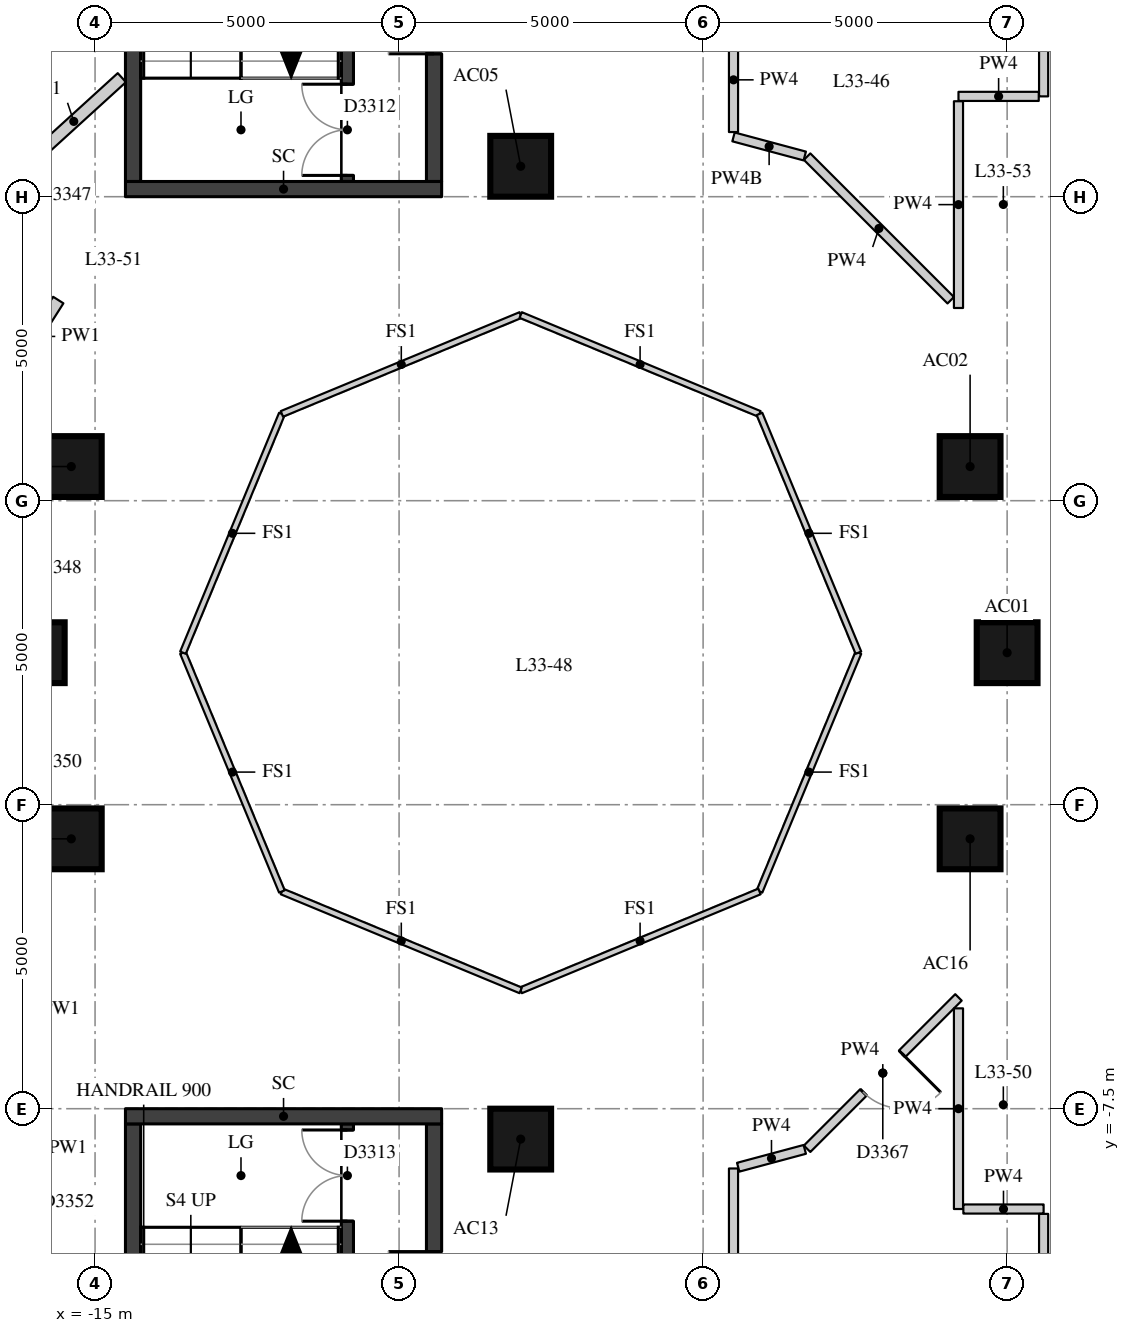
"""IFC4 building model, lengths in metres.
Left out: names, types, materials, properties, quantities, classifications, styles, units other than length and angle.
Written with IfcOpenShell. Run it as: python <this file> out.ifc"""

import sys

from ifc_helpers import new_model, si_unit, direction, frame, frame_2d, origin, origin_2d, place, context, subcontext, project, spatial, rectangle, extrude, element, fill, save


model = new_model("IFC4")
c1 = context("Model", 3, precision=1e-05, world=origin(), true_north=direction((0.0, 1.0)))
c2 = subcontext(c1, "Body", "Model", "MODEL_VIEW")
j1 = project(units=[si_unit("LENGTHUNIT", "METRE"), si_unit("PLANEANGLEUNIT", "RADIAN")], contexts=[c1])
p1 = place(None, origin())
s1 = spatial("IfcSite", under=j1, at=p1, CompositionType="ELEMENT")
p2 = place(p1, origin())
s2 = spatial("IfcBuilding", under=s1, at=p2, CompositionType="ELEMENT")
p3 = place(p2, frame((0.0, 0.0, 118.6)))
s3 = spatial("IfcBuildingStorey", under=s2, at=p3, CompositionType="ELEMENT", Elevation=118.6)
for number, where, z_axis, x_axis in (
    (1, (0.0, 0.0, 0.0), (0.0, 0.0, 1.0), (1.0, 0.0, 0.0)),
    (2, (-0.609, 3.062, 0.0), (0.0, 0.0, 1.0), (1.0, 0.0, 0.0)),
    (3, (-8.0, 8.0, 0.0), (0.0, 0.0, 1.0), (1.0, 0.0, 0.0)),
    (4, (-15.391, 3.062, 0.0), (0.0, 0.0, 1.0), (1.0, 0.0, 0.0)),
    (5, (-16.0, 0.0, 0.0), (0.0, 0.0, 1.0), (1.0, 0.0, 0.0)),
    (6, (-15.391, -3.062, 0.0), (0.0, 0.0, 1.0), (1.0, 0.0, 0.0)),
    (7, (-8.0, -8.0, 0.0), (0.0, 0.0, 1.0), (1.0, 0.0, 0.0)),
    (8, (-0.609, -3.062, 0.0), (0.0, 0.0, 1.0), (1.0, 0.0, 0.0)),
):
    element("IfcColumn", number, at=place(p3, frame(where, z_axis=z_axis, x_axis=x_axis)), inside=s3, PredefinedType="COLUMN", context=c2, shape_type="SweptSolid", body=[
        extrude(rectangle(XDim=1.0, YDim=1.0, at=origin_2d()), origin(), (0.0, 0.0, 1.0), 3.3),
    ])
p4 = place(p3, frame((-10.85, 7.75, 0.0), z_axis=(0.0, 0.0, 1.0), x_axis=(0.0, 1.0, 0.0)))
e9 = element("IfcWall", 9, at=p4, inside=s3, PredefinedType="SHEAR", context=c2, shape_type="SweptSolid", body=[
    extrude(rectangle(XDim=6.0, YDim=0.2, at=frame_2d((3.0, 0.0))), origin(), (0.0, 0.0, 1.0), 3.02),
])
p5 = place(p4, frame((0.1, 0.0, 0.0)))
e10 = element("IfcOpeningElement", 10, at=p5, cuts=e9, PredefinedType="OPENING", context=c2, shape_type="SweptSolid", body=[
    extrude(rectangle(XDim=1.5, YDim=2.1, at=frame_2d((0.75, 1.05))), frame((0.0, 0.11, 0.0), z_axis=(0.0, -1.0, 0.0), x_axis=(1.0, 0.0, 0.0)), (0.0, 0.0, 1.0), 0.22),
])
p6 = place(p3, frame((-10.85, -13.75, 0.0), z_axis=(0.0, 0.0, 1.0), x_axis=(0.0, 1.0, 0.0)))
e11 = element("IfcWall", 11, at=p6, inside=s3, PredefinedType="SHEAR", context=c2, shape_type="SweptSolid", body=[
    extrude(rectangle(XDim=6.0, YDim=0.2, at=frame_2d((3.0, 0.0))), origin(), (0.0, 0.0, 1.0), 3.02),
])
p7 = place(p6, frame((4.4, 0.0, 0.0)))
e12 = element("IfcOpeningElement", 12, at=p7, cuts=e11, PredefinedType="OPENING", context=c2, shape_type="SweptSolid", body=[
    extrude(rectangle(XDim=1.5, YDim=2.1, at=frame_2d((0.75, 1.05))), frame((0.0, 0.11, 0.0), z_axis=(0.0, -1.0, 0.0), x_axis=(1.0, 0.0, 0.0)), (0.0, 0.0, 1.0), 0.22),
])
p8 = place(p3, frame((-14.375, 7.75, -0.28), z_axis=(0.0, 0.0, 1.0), x_axis=(0.0, 1.0, 0.0)))
e13 = element("IfcWall", 13, at=p8, inside=s3, PredefinedType="SHEAR", context=c2, shape_type="SweptSolid", body=[
    extrude(rectangle(XDim=6.0, YDim=0.25, at=frame_2d((3.0, 0.0))), origin(), (0.0, 0.0, 1.0), 3.3),
])
p9 = place(p3, frame((-9.425, 7.75, -0.28), z_axis=(0.0, 0.0, 1.0), x_axis=(0.0, 1.0, 0.0)))
e14 = element("IfcWall", 14, at=p9, inside=s3, PredefinedType="SHEAR", context=c2, shape_type="SweptSolid", body=[
    extrude(rectangle(XDim=6.0, YDim=0.25, at=frame_2d((3.0, 0.0))), origin(), (0.0, 0.0, 1.0), 3.3),
])
p10 = place(p9, frame((2.1, 0.0, 0.28)))
e15 = element("IfcOpeningElement", 15, at=p10, cuts=e14, PredefinedType="OPENING", context=c2, shape_type="SweptSolid", body=[
    extrude(rectangle(XDim=1.5, YDim=2.1, at=frame_2d((0.75, 1.05))), frame((0.0, 0.135, 0.0), z_axis=(0.0, -1.0, 0.0), x_axis=(1.0, 0.0, 0.0)), (0.0, 0.0, 1.0), 0.27),
])
p11 = place(p3, frame((-14.5, 7.625, -0.28), z_axis=(0.0, 0.0, 1.0), x_axis=(1.0, 0.0, 0.0)))
e16 = element("IfcWall", 16, at=p11, inside=s3, PredefinedType="SHEAR", context=c2, shape_type="SweptSolid", body=[
    extrude(rectangle(XDim=5.2, YDim=0.25, at=frame_2d((2.6, 0.0))), origin(), (0.0, 0.0, 1.0), 3.3),
])
p12 = place(p3, frame((-14.375, -13.75, -0.28), z_axis=(0.0, 0.0, 1.0), x_axis=(0.0, 1.0, 0.0)))
e17 = element("IfcWall", 17, at=p12, inside=s3, PredefinedType="SHEAR", context=c2, shape_type="SweptSolid", body=[
    extrude(rectangle(XDim=6.0, YDim=0.25, at=frame_2d((3.0, 0.0))), origin(), (0.0, 0.0, 1.0), 3.3),
])
p13 = place(p3, frame((-9.425, -13.75, -0.28), z_axis=(0.0, 0.0, 1.0), x_axis=(0.0, 1.0, 0.0)))
e18 = element("IfcWall", 18, at=p13, inside=s3, PredefinedType="SHEAR", context=c2, shape_type="SweptSolid", body=[
    extrude(rectangle(XDim=6.0, YDim=0.25, at=frame_2d((3.0, 0.0))), origin(), (0.0, 0.0, 1.0), 3.3),
])
p14 = place(p13, frame((2.4, 0.0, 0.28)))
e19 = element("IfcOpeningElement", 19, at=p14, cuts=e18, PredefinedType="OPENING", context=c2, shape_type="SweptSolid", body=[
    extrude(rectangle(XDim=1.5, YDim=2.1, at=frame_2d((0.75, 1.05))), frame((0.0, 0.135, 0.0), z_axis=(0.0, -1.0, 0.0), x_axis=(1.0, 0.0, 0.0)), (0.0, 0.0, 1.0), 0.27),
])
p15 = place(p3, frame((-14.5, -7.625, -0.28), z_axis=(0.0, 0.0, 1.0), x_axis=(1.0, 0.0, 0.0)))
e20 = element("IfcWall", 20, at=p15, inside=s3, PredefinedType="SHEAR", context=c2, shape_type="SweptSolid", body=[
    extrude(rectangle(XDim=5.2, YDim=0.25, at=frame_2d((2.6, 0.0))), origin(), (0.0, 0.0, 1.0), 3.3),
])
p16 = place(p3, frame((-16.366, 4.604, 0.0), z_axis=(0.0, 0.0, 1.0), x_axis=(0.536775234189, 0.843725279911, 0.0)))
e21 = element("IfcWall", 21, at=p16, inside=s3, PredefinedType="PARTITIONING", context=c2, shape_type="SweptSolid", body=[
    extrude(rectangle(XDim=1.418, YDim=0.2, at=frame_2d((0.709, 0.0))), origin(), (0.0, 0.0, 1.0), 3.02),
])
p17 = place(p3, frame((-16.14, 8.019, 0.0), z_axis=(0.0, 0.0, 1.0), x_axis=(0.739392120684, 0.673275049197, 0.0)))
e22 = element("IfcWall", 22, at=p17, inside=s3, PredefinedType="PARTITIONING", context=c2, shape_type="SweptSolid", body=[
    extrude(rectangle(XDim=2.138, YDim=0.2, at=frame_2d((1.069, 0.0))), origin(), (0.0, 0.0, 1.0), 3.02),
])
p18 = place(p3, frame((0.6, 11.917, 0.0), z_axis=(0.0, 0.0, 1.0), x_axis=(0.0, -1.0, 0.0)))
e23 = element("IfcWall", 23, at=p18, inside=s3, PredefinedType="PARTITIONING", context=c2, shape_type="SweptSolid", body=[
    extrude(rectangle(XDim=2.767, YDim=0.15, at=frame_2d((1.384, 0.0))), origin(), (0.0, 0.0, 1.0), 3.02),
])
p19 = place(p3, frame((0.52, 9.15, 0.0), z_axis=(0.0, 0.0, 1.0), x_axis=(-1.0, 0.0, 0.0)))
e24 = element("IfcWall", 24, at=p19, inside=s3, PredefinedType="PARTITIONING", context=c2, shape_type="SweptSolid", body=[
    extrude(rectangle(XDim=1.32, YDim=0.15, at=frame_2d((0.66, 0.0))), origin(), (0.0, 0.0, 1.0), 3.02),
])
p20 = place(p3, frame((-0.8, 9.07, 0.0), z_axis=(0.0, 0.0, 1.0), x_axis=(0.0, -1.0, 0.0)))
e25 = element("IfcWall", 25, at=p20, inside=s3, PredefinedType="PARTITIONING", context=c2, shape_type="SweptSolid", body=[
    extrude(rectangle(XDim=3.4, YDim=0.15, at=frame_2d((1.7, 0.0))), origin(), (0.0, 0.0, 1.0), 3.02),
])
p21 = place(p3, frame((-0.927, 5.797, 0.0), z_axis=(0.0, 0.0, 1.0), x_axis=(-0.707106781187, 0.707106781187, 0.0)))
e26 = element("IfcWall", 26, at=p21, inside=s3, PredefinedType="PARTITIONING", context=c2, shape_type="SweptSolid", body=[
    extrude(rectangle(XDim=3.341, YDim=0.15, at=frame_2d((1.67, 0.0))), origin(), (0.0, 0.0, 1.0), 3.02),
])
p22 = place(p3, frame((-3.328, 8.169, 0.0), z_axis=(0.0, 0.0, 1.0), x_axis=(-0.965933680277, 0.258789731841, 0.0)))
e27 = element("IfcWall", 27, at=p22, inside=s3, PredefinedType="PARTITIONING", context=c2, shape_type="SweptSolid", body=[
    extrude(rectangle(XDim=1.213, YDim=0.15, at=frame_2d((0.606, 0.0))), origin(), (0.0, 0.0, 1.0), 2.47),
])
p23 = place(p3, frame((-4.5, 8.563, 0.0), z_axis=(0.0, 0.0, 1.0), x_axis=(0.0, 1.0, 0.0)))
e28 = element("IfcWall", 28, at=p23, inside=s3, PredefinedType="PARTITIONING", context=c2, shape_type="SweptSolid", body=[
    extrude(rectangle(XDim=1.717, YDim=0.15, at=frame_2d((0.859, 0.0))), origin(), (0.0, 0.0, 1.0), 3.02),
])
p24 = place(p3, frame((-3.29, -8.159, 0.0), z_axis=(0.0, 0.0, 1.0), x_axis=(0.707106781187, 0.707106781187, 0.0)))
e29 = element("IfcWall", 29, at=p24, inside=s3, PredefinedType="PARTITIONING", context=c2, shape_type="SweptSolid", body=[
    extrude(rectangle(XDim=3.521, YDim=0.15, at=frame_2d((1.76, 0.0))), origin(), (0.0, 0.0, 1.0), 3.02),
])
p25 = place(p24, frame((1.31, 0.0, 0.0)))
e30 = element("IfcOpeningElement", 30, at=p25, cuts=e29, PredefinedType="OPENING", context=c2, shape_type="SweptSolid", body=[
    extrude(rectangle(XDim=0.9, YDim=2.1, at=frame_2d((0.45, 1.05))), frame((0.0, 0.085, 0.0), z_axis=(0.0, -1.0, 0.0), x_axis=(1.0, 0.0, 0.0)), (0.0, 0.0, 1.0), 0.17),
])
p26 = place(p3, frame((-0.8, -5.85, 0.0), z_axis=(0.0, 0.0, 1.0), x_axis=(0.0, -1.0, 0.0)))
e31 = element("IfcWall", 31, at=p26, inside=s3, PredefinedType="PARTITIONING", context=c2, shape_type="SweptSolid", body=[
    extrude(rectangle(XDim=3.3, YDim=0.15, at=frame_2d((1.65, 0.0))), origin(), (0.0, 0.0, 1.0), 3.02),
])
p27 = place(p3, frame((-0.72, -9.15, 0.0), z_axis=(0.0, 0.0, 1.0), x_axis=(1.0, 0.0, 0.0)))
e32 = element("IfcWall", 32, at=p27, inside=s3, PredefinedType="PARTITIONING", context=c2, shape_type="SweptSolid", body=[
    extrude(rectangle(XDim=1.32, YDim=0.15, at=frame_2d((0.66, 0.0))), origin(), (0.0, 0.0, 1.0), 3.02),
])
p28 = place(p3, frame((0.6, -9.23, 0.0), z_axis=(0.0, 0.0, 1.0), x_axis=(0.0, -1.0, 0.0)))
e33 = element("IfcWall", 33, at=p28, inside=s3, PredefinedType="PARTITIONING", context=c2, shape_type="SweptSolid", body=[
    extrude(rectangle(XDim=5.315, YDim=0.15, at=frame_2d((2.657, 0.0))), origin(), (0.0, 0.0, 1.0), 3.02),
])
p29 = place(p3, frame((-4.5, -12.79, 0.0), z_axis=(0.0, 0.0, 1.0), x_axis=(0.0, 1.0, 0.0)))
e34 = element("IfcWall", 34, at=p29, inside=s3, PredefinedType="PARTITIONING", context=c2, shape_type="SweptSolid", body=[
    extrude(rectangle(XDim=4.307, YDim=0.15, at=frame_2d((2.154, 0.0))), origin(), (0.0, 0.0, 1.0), 3.02),
])
p30 = place(p3, frame((-4.423, -8.463, 0.0), z_axis=(0.0, 0.0, 1.0), x_axis=(0.965898042479, 0.258922713439, 0.0)))
e35 = element("IfcWall", 35, at=p30, inside=s3, PredefinedType="PARTITIONING", context=c2, shape_type="SweptSolid", body=[
    extrude(rectangle(XDim=1.133, YDim=0.15, at=frame_2d((0.567, 0.0))), origin(), (0.0, 0.0, 1.0), 3.02),
])
for number, where, z_axis, x_axis in (
    (36, (-2.446, 0.0, 0.0), (0.0, 0.0, 1.0), (-0.383, -0.924, 0.0)),
    (37, (-4.073, -3.927, 0.0), (0.0, 0.0, 1.0), (-0.924, -0.383, 0.0)),
    (38, (-8.0, -5.554, 0.0), (0.0, 0.0, 1.0), (-0.924, 0.383, 0.0)),
    (39, (-11.927, -3.927, 0.0), (0.0, 0.0, 1.0), (-0.383, 0.924, 0.0)),
    (40, (-13.554, 0.0, 0.0), (0.0, 0.0, 1.0), (0.383, 0.924, 0.0)),
    (41, (-11.927, 3.927, 0.0), (0.0, 0.0, 1.0), (0.924, 0.383, 0.0)),
    (42, (-8.0, 5.554, 0.0), (0.0, 0.0, 1.0), (0.924, -0.383, 0.0)),
    (43, (-4.073, 3.927, 0.0), (0.0, 0.0, 1.0), (0.383, -0.924, 0.0)),
):
    element("IfcWall", number, at=place(p3, frame(where, z_axis=z_axis, x_axis=x_axis)), inside=s3, PredefinedType="PARTITIONING", context=c2, shape_type="SweptSolid", body=[
        extrude(rectangle(XDim=4.251, YDim=0.1, at=frame_2d((2.125, 0.0))), origin(), (0.0, 0.0, 1.0), 3.02),
    ])
p31 = place(p5, origin())
e44 = element("IfcDoor", 44, at=p31, inside=s3, OperationType="DOUBLE_DOOR_SINGLE_SWING", PredefinedType="DOOR", context=c2, shape_type="SweptSolid", body=[
    extrude(rectangle(XDim=1.5, YDim=2.1, at=frame_2d((0.75, 1.05))), frame((0.0, 0.025, 0.0), z_axis=(0.0, -1.0, 0.0), x_axis=(1.0, 0.0, 0.0)), (0.0, 0.0, 1.0), 0.05),
])
fill(e10, e44)
p32 = place(p7, origin())
e45 = element("IfcDoor", 45, at=p32, inside=s3, OperationType="DOUBLE_DOOR_SINGLE_SWING", PredefinedType="DOOR", context=c2, shape_type="SweptSolid", body=[
    extrude(rectangle(XDim=1.5, YDim=2.1, at=frame_2d((0.75, 1.05))), frame((0.0, 0.025, 0.0), z_axis=(0.0, -1.0, 0.0), x_axis=(1.0, 0.0, 0.0)), (0.0, 0.0, 1.0), 0.05),
])
fill(e12, e45)
p33 = place(p10, origin())
e46 = element("IfcDoor", 46, at=p33, inside=s3, OperationType="DOUBLE_DOOR_SINGLE_SWING", PredefinedType="DOOR", context=c2, shape_type="SweptSolid", body=[
    extrude(rectangle(XDim=1.5, YDim=2.1, at=frame_2d((0.75, 1.05))), frame((0.0, 0.025, 0.0), z_axis=(0.0, -1.0, 0.0), x_axis=(1.0, 0.0, 0.0)), (0.0, 0.0, 1.0), 0.05),
])
fill(e15, e46)
p34 = place(p14, origin())
e47 = element("IfcDoor", 47, at=p34, inside=s3, OperationType="DOUBLE_DOOR_SINGLE_SWING", PredefinedType="DOOR", context=c2, shape_type="SweptSolid", body=[
    extrude(rectangle(XDim=1.5, YDim=2.1, at=frame_2d((0.75, 1.05))), frame((0.0, 0.025, 0.0), z_axis=(0.0, -1.0, 0.0), x_axis=(1.0, 0.0, 0.0)), (0.0, 0.0, 1.0), 0.05),
])
fill(e19, e47)
p35 = place(p25, origin())
e48 = element("IfcDoor", 48, at=p35, inside=s3, OperationType="SINGLE_SWING_LEFT", PredefinedType="DOOR", context=c2, shape_type="SweptSolid", body=[
    extrude(rectangle(XDim=0.9, YDim=2.1, at=frame_2d((0.45, 1.05))), frame((0.0, 0.025, 0.0), z_axis=(0.0, -1.0, 0.0), x_axis=(1.0, 0.0, 0.0)), (0.0, 0.0, 1.0), 0.05),
])
fill(e30, e48)
save(model, sys.argv[1])
